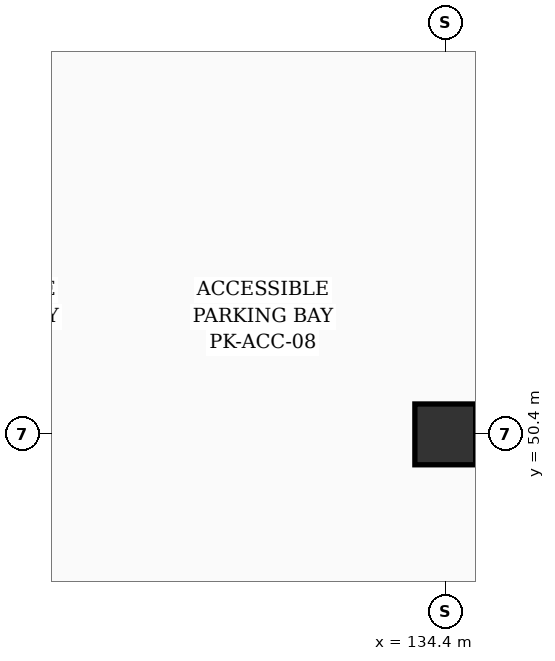
"""IFC4 building model, lengths in metres.
Left out: names, types, materials, properties, quantities, classifications, styles, units other than length and angle.
Written with IfcOpenShell. Run it as: python <this file> out.ifc"""

import sys

from ifc_helpers import new_model, si_unit, direction, frame, origin, origin_2d, place, context, subcontext, project, spatial, rectangle, extrude, element, save


model = new_model("IFC4")
c1 = context("Model", 3, precision=1e-05, world=origin(), true_north=direction((0.0, 1.0)))
c2 = subcontext(c1, "Body", "Model", "MODEL_VIEW")
j1 = project(units=[si_unit("LENGTHUNIT", "METRE"), si_unit("PLANEANGLEUNIT", "RADIAN")], contexts=[c1])
p1 = place(None, origin())
s1 = spatial("IfcSite", under=j1, at=p1, CompositionType="ELEMENT")
p2 = place(p1, origin())
s2 = spatial("IfcBuilding", under=s1, at=p2, CompositionType="ELEMENT")
p3 = place(p2, frame((0.0, 0.0, -4.2)))
s3 = spatial("IfcBuildingStorey", under=s2, at=p3, CompositionType="ELEMENT", Elevation=-4.2)
p4 = place(p3, frame((134.4, 50.4, 0.0), z_axis=(0.0, 0.0, 1.0), x_axis=(1.0, 0.0, 0.0)))
e1 = element("IfcColumn", 1, at=p4, inside=s3, PredefinedType="COLUMN", context=c2, shape_type="SweptSolid", body=[
    extrude(rectangle(XDim=0.8, YDim=0.8, at=origin_2d()), origin(), (0.0, 0.0, 1.0), 4.2),
])
save(model, sys.argv[1])
